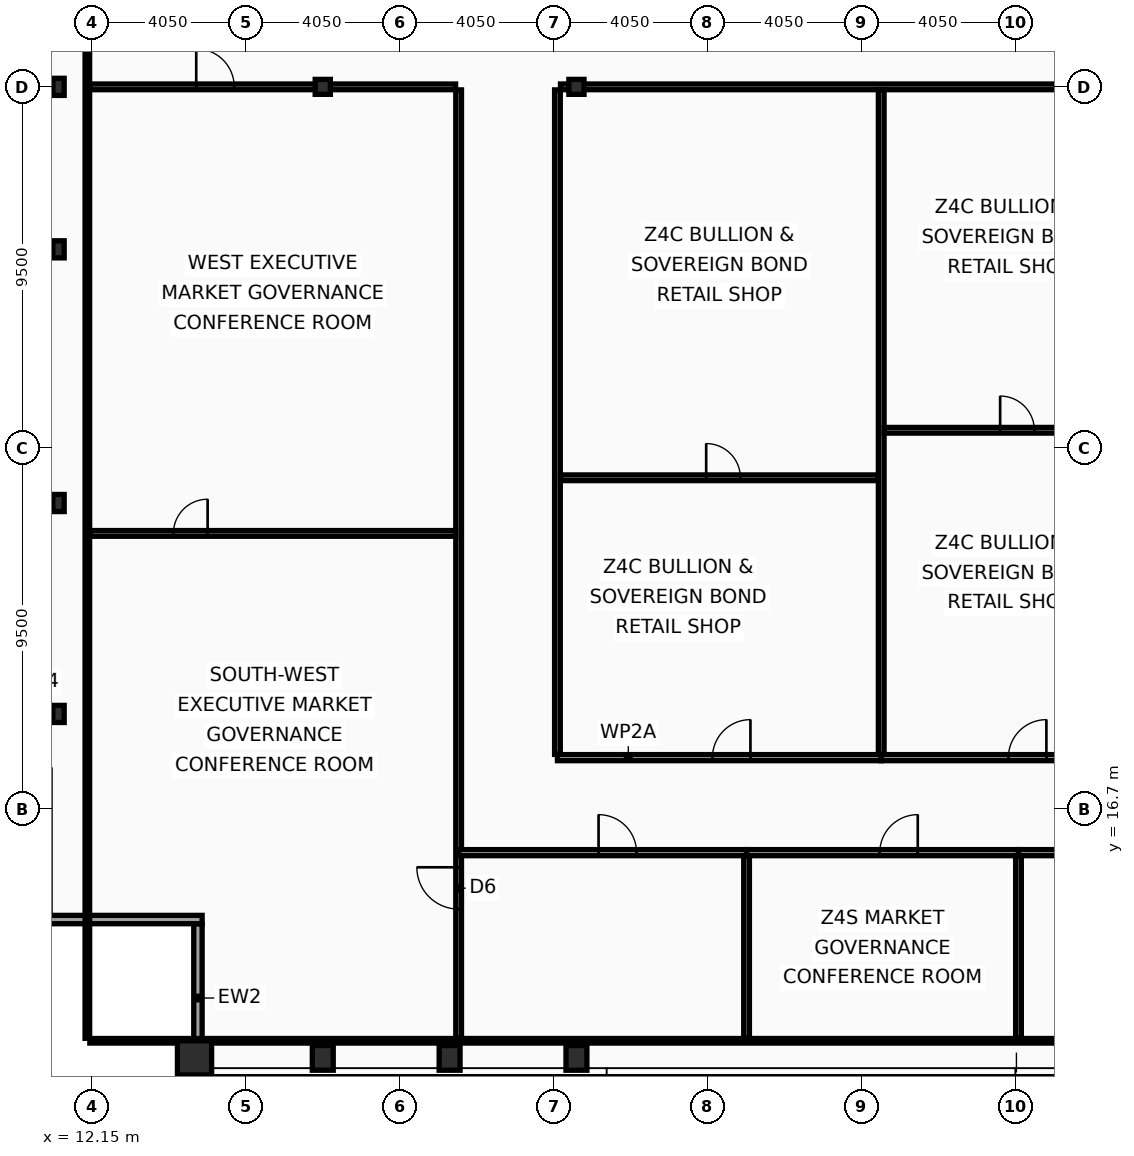
"""IFC4 building model, lengths in metres.
Left out: names, types, materials, properties, quantities, classifications, styles, units other than length and angle.
Written with IfcOpenShell. Run it as: python <this file> out.ifc"""

import sys

from ifc_helpers import new_model, si_unit, direction, frame, frame_2d, origin, origin_2d, place, context, subcontext, project, spatial, rectangle, hollow_rectangle, i_section, extrude, element, fill, save


model = new_model("IFC4")
c1 = context("Model", 3, precision=1e-05, world=origin(), true_north=direction((0.0, 1.0)))
c2 = subcontext(c1, "Body", "Model", "MODEL_VIEW")
j1 = project(units=[si_unit("LENGTHUNIT", "METRE"), si_unit("PLANEANGLEUNIT", "RADIAN")], contexts=[c1])
p1 = place(None, origin())
s1 = spatial("IfcSite", under=j1, at=p1, CompositionType="ELEMENT")
p2 = place(p1, origin())
s2 = spatial("IfcBuilding", under=s1, at=p2, CompositionType="ELEMENT")
p3 = place(p2, frame((0.0, 0.0, 343.4)))
s3 = spatial("IfcBuildingStorey", under=s2, at=p3, CompositionType="ELEMENT", Elevation=343.4)
p4 = place(p3, frame((14.85, 10.15, 0.0), z_axis=(0.0, 0.0, 1.0), x_axis=(1.0, 0.0, 0.0)))
e1 = element("IfcColumn", 1, at=p4, inside=s3, PredefinedType="COLUMN", context=c2, shape_type="SweptSolid", body=[
    extrude(hollow_rectangle(XDim=0.9, YDim=0.9, WallThickness=0.05, at=origin_2d()), origin(), (0.0, 0.0, 1.0), 3.6),
])
for number, where, z_axis, x_axis in (
    (2, (18.225, 10.15, 0.0), (0.0, 0.0, 1.0), (1.0, 0.0, 0.0)),
    (3, (21.562, 10.15, 0.0), (0.0, 0.0, 1.0), (1.0, 0.0, 0.0)),
    (4, (24.9, 10.15, 0.0), (0.0, 0.0, 1.0), (1.0, 0.0, 0.0)),
):
    element("IfcColumn", number, at=place(p3, frame(where, z_axis=z_axis, x_axis=x_axis)), inside=s3, PredefinedType="COLUMN", context=c2, shape_type="SweptSolid", body=[
        extrude(hollow_rectangle(XDim=0.55, YDim=0.65, WallThickness=0.04, at=origin_2d()), origin(), (0.0, 0.0, 1.0), 3.6),
    ])
for number, where, z_axis, x_axis in (
    (5, (11.27, 19.2, 0.0), (0.0, 0.0, 1.0), (1.0, 0.0, 0.0)),
    (6, (11.27, 24.75, 0.0), (0.0, 0.0, 1.0), (1.0, 0.0, 0.0)),
    (7, (11.27, 31.425, 0.0), (0.0, 0.0, 1.0), (1.0, 0.0, 0.0)),
    (8, (11.27, 35.7, 0.0), (0.0, 0.0, 1.0), (1.0, 0.0, 0.0)),
):
    element("IfcColumn", number, at=place(p3, frame(where, z_axis=z_axis, x_axis=x_axis)), inside=s3, PredefinedType="COLUMN", context=c2, shape_type="SweptSolid", body=[
        extrude(i_section(OverallWidth=0.3, OverallDepth=0.45, WebThickness=0.014, FlangeThickness=0.026, at=origin_2d()), origin(), (0.0, 0.0, 1.0), 3.6),
    ])
for number, where, z_axis, x_axis in (
    (9, (18.225, 35.7, 0.0), (0.0, 0.0, 1.0), (1.0, 0.0, 0.0)),
    (10, (24.9, 35.7, 0.0), (0.0, 0.0, 1.0), (1.0, 0.0, 0.0)),
):
    element("IfcColumn", number, at=place(p3, frame(where, z_axis=z_axis, x_axis=x_axis)), inside=s3, PredefinedType="COLUMN", context=c2, shape_type="SweptSolid", body=[
        extrude(i_section(OverallWidth=0.399, OverallDepth=0.393, WebThickness=0.023, FlangeThickness=0.037, at=origin_2d()), origin(), (0.0, 0.0, 1.0), 3.6),
    ])
p5 = place(p3, frame((14.94, 9.77, 0.0), z_axis=(0.0, 0.0, 1.0), x_axis=(0.0, 1.0, 0.0)))
e11 = element("IfcWall", 11, at=p5, inside=s3, PredefinedType="SOLIDWALL", context=c2, shape_type="SweptSolid", body=[
    extrude(rectangle(XDim=3.91, YDim=0.22, at=frame_2d((1.955, 0.0))), origin(), (0.0, 0.0, 1.0), 2.88),
])
p6 = place(p3, frame((15.05, 13.79, 0.0), z_axis=(0.0, 0.0, 1.0), x_axis=(-1.0, 0.0, 0.0)))
e12 = element("IfcWall", 12, at=p6, inside=s3, PredefinedType="SOLIDWALL", context=c2, shape_type="SweptSolid", body=[
    extrude(rectangle(XDim=4.22, YDim=0.22, at=frame_2d((2.11, 0.0))), origin(), (0.0, 0.0, 1.0), 2.88),
])
p7 = place(p3, frame((21.8, 10.665, 0.0), z_axis=(0.0, 0.0, 1.0), x_axis=(0.0, 1.0, 0.0)))
e13 = element("IfcWall", 13, at=p7, inside=s3, PredefinedType="PARTITIONING", context=c2, shape_type="SweptSolid", body=[
    extrude(rectangle(XDim=24.955, YDim=0.15, at=frame_2d((12.478, 0.0))), origin(), (0.0, 0.0, 1.0), 3.07),
])
p8 = place(p7, frame((3.4, 0.0, 0.0)))
e14 = element("IfcOpeningElement", 14, at=p8, cuts=e13, PredefinedType="OPENING", context=c2, shape_type="SweptSolid", body=[
    extrude(rectangle(XDim=1.1, YDim=2.1, at=frame_2d((0.55, 1.05))), frame((0.0, 0.085, 0.0), z_axis=(0.0, -1.0, 0.0), x_axis=(1.0, 0.0, 0.0)), (0.0, 0.0, 1.0), 0.17),
])
p9 = place(p3, frame((12.095, 35.7, 0.0), z_axis=(0.0, 0.0, 1.0), x_axis=(1.0, 0.0, 0.0)))
e15 = element("IfcWall", 15, at=p9, inside=s3, PredefinedType="PARTITIONING", context=c2, shape_type="SweptSolid", body=[
    extrude(rectangle(XDim=9.625, YDim=0.15, at=frame_2d((4.812, 0.0))), origin(), (0.0, 0.0, 1.0), 2.83),
])
p10 = place(p9, frame((2.8, 0.0, 0.0)))
e16 = element("IfcOpeningElement", 16, at=p10, cuts=e15, PredefinedType="OPENING", context=c2, shape_type="SweptSolid", body=[
    extrude(rectangle(XDim=1.0, YDim=2.05, at=frame_2d((0.5, 1.025))), frame((0.0, 0.085, 0.0), z_axis=(0.0, -1.0, 0.0), x_axis=(1.0, 0.0, 0.0)), (0.0, 0.0, 1.0), 0.17),
])
p11 = place(p3, frame((12.095, 23.95, 0.0), z_axis=(0.0, 0.0, 1.0), x_axis=(1.0, 0.0, 0.0)))
e17 = element("IfcWall", 17, at=p11, inside=s3, PredefinedType="PARTITIONING", context=c2, shape_type="SweptSolid", body=[
    extrude(rectangle(XDim=9.625, YDim=0.15, at=frame_2d((4.812, 0.0))), origin(), (0.0, 0.0, 1.0), 2.83),
])
p12 = place(p11, frame((2.2, 0.0, 0.0)))
e18 = element("IfcOpeningElement", 18, at=p12, cuts=e17, PredefinedType="OPENING", context=c2, shape_type="SweptSolid", body=[
    extrude(rectangle(XDim=0.9, YDim=2.05, at=frame_2d((0.45, 1.025))), frame((0.0, 0.085, 0.0), z_axis=(0.0, -1.0, 0.0), x_axis=(1.0, 0.0, 0.0)), (0.0, 0.0, 1.0), 0.17),
])
p13 = place(p3, frame((24.4, 18.135, 0.0), z_axis=(0.0, 0.0, 1.0), x_axis=(0.0, 1.0, 0.0)))
e19 = element("IfcWall", 19, at=p13, inside=s3, PredefinedType="PARTITIONING", context=c2, shape_type="SweptSolid", body=[
    extrude(rectangle(XDim=17.485, YDim=0.15, at=frame_2d((8.743, 0.0))), origin(), (0.0, 0.0, 1.0), 2.83),
])
p14 = place(p3, frame((24.48, 35.7, 0.0), z_axis=(0.0, 0.0, 1.0), x_axis=(1.0, 0.0, 0.0)))
e20 = element("IfcWall", 20, at=p14, inside=s3, PredefinedType="PARTITIONING", context=c2, shape_type="SweptSolid", body=[
    extrude(rectangle(XDim=25.02, YDim=0.15, at=frame_2d((12.51, 0.0))), origin(), (0.0, 0.0, 1.0), 2.83),
])
p15 = place(p3, frame((24.4, 18.05, 0.0), z_axis=(0.0, 0.0, 1.0), x_axis=(1.0, 0.0, 0.0)))
e21 = element("IfcWall", 21, at=p15, inside=s3, PredefinedType="PARTITIONING", context=c2, shape_type="SweptSolid", body=[
    extrude(rectangle(XDim=8.52, YDim=0.16, at=frame_2d((4.26, 0.0))), origin(), (0.0, 0.0, 1.0), 2.83),
])
p16 = place(p15, frame((4.078, 0.0, 0.0)))
e22 = element("IfcOpeningElement", 22, at=p16, cuts=e21, PredefinedType="OPENING", context=c2, shape_type="SweptSolid", body=[
    extrude(rectangle(XDim=1.0, YDim=2.05, at=frame_2d((0.5, 1.025))), frame((0.0, 0.09, 0.0), z_axis=(0.0, -1.0, 0.0), x_axis=(1.0, 0.0, 0.0)), (0.0, 0.0, 1.0), 0.18),
])
p17 = place(p3, frame((24.48, 25.414, 0.0), z_axis=(0.0, 0.0, 1.0), x_axis=(1.0, 0.0, 0.0)))
e23 = element("IfcWall", 23, at=p17, inside=s3, PredefinedType="PARTITIONING", context=c2, shape_type="SweptSolid", body=[
    extrude(rectangle(XDim=8.36, YDim=0.15, at=frame_2d((4.18, 0.0))), origin(), (0.0, 0.0, 1.0), 2.83),
])
p18 = place(p17, frame((3.834, 0.0, 0.0)))
e24 = element("IfcOpeningElement", 24, at=p18, cuts=e23, PredefinedType="OPENING", context=c2, shape_type="SweptSolid", body=[
    extrude(rectangle(XDim=0.9, YDim=2.05, at=frame_2d((0.45, 1.025))), frame((0.0, 0.085, 0.0), z_axis=(0.0, -1.0, 0.0), x_axis=(1.0, 0.0, 0.0)), (0.0, 0.0, 1.0), 0.17),
])
p19 = place(p3, frame((32.92, 18.05, 0.0), z_axis=(0.0, 0.0, 1.0), x_axis=(1.0, 0.0, 0.0)))
e25 = element("IfcWall", 25, at=p19, inside=s3, PredefinedType="PARTITIONING", context=c2, shape_type="SweptSolid", body=[
    extrude(rectangle(XDim=6.776, YDim=0.16, at=frame_2d((3.388, 0.0))), origin(), (0.0, 0.0, 1.0), 3.44),
])
p20 = place(p19, frame((3.346, 0.0, 0.0)))
e26 = element("IfcOpeningElement", 26, at=p20, cuts=e25, PredefinedType="OPENING", context=c2, shape_type="SweptSolid", body=[
    extrude(rectangle(XDim=1.0, YDim=2.05, at=frame_2d((0.5, 1.025))), frame((0.0, 0.09, 0.0), z_axis=(0.0, -1.0, 0.0), x_axis=(1.0, 0.0, 0.0)), (0.0, 0.0, 1.0), 0.18),
])
p21 = place(p3, frame((32.92, 18.135, 0.0), z_axis=(0.0, 0.0, 1.0), x_axis=(0.0, 1.0, 0.0)))
e27 = element("IfcWall", 27, at=p21, inside=s3, PredefinedType="PARTITIONING", context=c2, shape_type="SweptSolid", body=[
    extrude(rectangle(XDim=17.485, YDim=0.15, at=frame_2d((8.743, 0.0))), origin(), (0.0, 0.0, 1.0), 3.07),
])
p22 = place(p3, frame((33.0, 26.664, 0.0), z_axis=(0.0, 0.0, 1.0), x_axis=(1.0, 0.0, 0.0)))
e28 = element("IfcWall", 28, at=p22, inside=s3, PredefinedType="PARTITIONING", context=c2, shape_type="SweptSolid", body=[
    extrude(rectangle(XDim=6.616, YDim=0.15, at=frame_2d((3.308, 0.0))), origin(), (0.0, 0.0, 1.0), 3.44),
])
p23 = place(p22, frame((3.049, 0.0, 0.0)))
e29 = element("IfcOpeningElement", 29, at=p23, cuts=e28, PredefinedType="OPENING", context=c2, shape_type="SweptSolid", body=[
    extrude(rectangle(XDim=0.9, YDim=2.05, at=frame_2d((0.45, 1.025))), frame((0.0, 0.085, 0.0), z_axis=(0.0, -1.0, 0.0), x_axis=(1.0, 0.0, 0.0)), (0.0, 0.0, 1.0), 0.17),
])
p24 = place(p3, frame((21.8, 15.55, 0.0), z_axis=(0.0, 0.0, 1.0), x_axis=(1.0, 0.0, 0.0)))
e30 = element("IfcWall", 30, at=p24, inside=s3, PredefinedType="PARTITIONING", context=c2, shape_type="SweptSolid", body=[
    extrude(rectangle(XDim=7.576, YDim=0.16, at=frame_2d((3.788, 0.0))), origin(), (0.0, 0.0, 1.0), 2.83),
])
p25 = place(p24, frame((3.682, 0.0, 0.0)))
e31 = element("IfcOpeningElement", 31, at=p25, cuts=e30, PredefinedType="OPENING", context=c2, shape_type="SweptSolid", body=[
    extrude(rectangle(XDim=1.0, YDim=2.05, at=frame_2d((0.5, 1.025))), frame((0.0, 0.09, 0.0), z_axis=(0.0, -1.0, 0.0), x_axis=(1.0, 0.0, 0.0)), (0.0, 0.0, 1.0), 0.18),
])
p26 = place(p3, frame((29.376, 15.55, 0.0), z_axis=(0.0, 0.0, 1.0), x_axis=(1.0, 0.0, 0.0)))
e32 = element("IfcWall", 32, at=p26, inside=s3, PredefinedType="PARTITIONING", context=c2, shape_type="SweptSolid", body=[
    extrude(rectangle(XDim=7.155, YDim=0.16, at=frame_2d((3.578, 0.0))), origin(), (0.0, 0.0, 1.0), 3.07),
])
p27 = place(p26, frame((3.505, 0.0, 0.0)))
e33 = element("IfcOpeningElement", 33, at=p27, cuts=e32, PredefinedType="OPENING", context=c2, shape_type="SweptSolid", body=[
    extrude(rectangle(XDim=1.0, YDim=2.05, at=frame_2d((0.5, 1.025))), frame((0.0, 0.09, 0.0), z_axis=(0.0, -1.0, 0.0), x_axis=(1.0, 0.0, 0.0)), (0.0, 0.0, 1.0), 0.18),
])
p28 = place(p3, frame((29.376, 10.665, 0.0), z_axis=(0.0, 0.0, 1.0), x_axis=(0.0, 1.0, 0.0)))
e34 = element("IfcWall", 34, at=p28, inside=s3, PredefinedType="PARTITIONING", context=c2, shape_type="SweptSolid", body=[
    extrude(rectangle(XDim=4.8, YDim=0.15, at=frame_2d((2.4, 0.0))), origin(), (0.0, 0.0, 1.0), 3.07),
])
p29 = place(p3, frame((36.532, 15.55, 0.0), z_axis=(0.0, 0.0, 1.0), x_axis=(1.0, 0.0, 0.0)))
e35 = element("IfcWall", 35, at=p29, inside=s3, PredefinedType="PARTITIONING", context=c2, shape_type="SweptSolid", body=[
    extrude(rectangle(XDim=13.048, YDim=0.16, at=frame_2d((6.524, 0.0))), origin(), (0.0, 0.0, 1.0), 2.83),
])
p30 = place(p29, frame((5.98, 0.0, 0.0)))
e36 = element("IfcOpeningElement", 36, at=p30, cuts=e35, PredefinedType="OPENING", context=c2, shape_type="SweptSolid", body=[
    extrude(rectangle(XDim=1.0, YDim=2.05, at=frame_2d((0.5, 1.025))), frame((0.0, 0.09, 0.0), z_axis=(0.0, -1.0, 0.0), x_axis=(1.0, 0.0, 0.0)), (0.0, 0.0, 1.0), 0.18),
])
p31 = place(p3, frame((36.532, 10.665, 0.0), z_axis=(0.0, 0.0, 1.0), x_axis=(0.0, 1.0, 0.0)))
e37 = element("IfcWall", 37, at=p31, inside=s3, PredefinedType="PARTITIONING", context=c2, shape_type="SweptSolid", body=[
    extrude(rectangle(XDim=4.8, YDim=0.15, at=frame_2d((2.4, 0.0))), origin(), (0.0, 0.0, 1.0), 3.07),
])
p32 = place(p3, frame((12.03, 10.665, 0.0), z_axis=(0.0, 0.0, 1.0), x_axis=(0.0, 1.0, 0.0)))
e38 = element("IfcWall", 38, at=p32, inside=s3, PredefinedType="PARTITIONING", context=c2, shape_type="SweptSolid", body=[
    extrude(rectangle(XDim=42.11, YDim=0.12, at=frame_2d((21.055, 0.0))), origin(), (0.0, 0.0, 1.0), 2.83),
])
p33 = place(p3, frame((12.095, 10.6, 0.0), z_axis=(0.0, 0.0, 1.0), x_axis=(1.0, 0.0, 0.0)))
e39 = element("IfcWall", 39, at=p33, inside=s3, PredefinedType="PARTITIONING", context=c2, shape_type="SweptSolid", body=[
    extrude(rectangle(XDim=48.71, YDim=0.12, at=frame_2d((24.355, 0.0))), origin(), (0.0, 0.0, 1.0), 2.83),
])
p34 = place(p8, origin())
e40 = element("IfcDoor", 40, at=p34, inside=s3, OperationType="SINGLE_SWING_RIGHT", PredefinedType="DOOR", context=c2, shape_type="SweptSolid", body=[
    extrude(rectangle(XDim=1.1, YDim=2.1, at=frame_2d((0.55, 1.05))), frame((0.0, 0.025, 0.0), z_axis=(0.0, -1.0, 0.0), x_axis=(1.0, 0.0, 0.0)), (0.0, 0.0, 1.0), 0.05),
])
fill(e14, e40)
p35 = place(p10, origin())
e41 = element("IfcDoor", 41, at=p35, inside=s3, OperationType="SINGLE_SWING_LEFT", PredefinedType="DOOR", context=c2, shape_type="SweptSolid", body=[
    extrude(rectangle(XDim=1.0, YDim=2.05, at=frame_2d((0.5, 1.025))), frame((0.0, 0.025, 0.0), z_axis=(0.0, -1.0, 0.0), x_axis=(1.0, 0.0, 0.0)), (0.0, 0.0, 1.0), 0.05),
])
fill(e16, e41)
p36 = place(p12, origin())
e42 = element("IfcDoor", 42, at=p36, inside=s3, OperationType="SINGLE_SWING_RIGHT", PredefinedType="DOOR", context=c2, shape_type="SweptSolid", body=[
    extrude(rectangle(XDim=0.9, YDim=2.05, at=frame_2d((0.45, 1.025))), frame((0.0, 0.025, 0.0), z_axis=(0.0, -1.0, 0.0), x_axis=(1.0, 0.0, 0.0)), (0.0, 0.0, 1.0), 0.05),
])
fill(e18, e42)
p37 = place(p16, origin())
e43 = element("IfcDoor", 43, at=p37, inside=s3, OperationType="SINGLE_SWING_RIGHT", PredefinedType="DOOR", context=c2, shape_type="SweptSolid", body=[
    extrude(rectangle(XDim=1.0, YDim=2.05, at=frame_2d((0.5, 1.025))), frame((0.0, 0.025, 0.0), z_axis=(0.0, -1.0, 0.0), x_axis=(1.0, 0.0, 0.0)), (0.0, 0.0, 1.0), 0.05),
])
fill(e22, e43)
p38 = place(p18, origin())
e44 = element("IfcDoor", 44, at=p38, inside=s3, OperationType="SINGLE_SWING_LEFT", PredefinedType="DOOR", context=c2, shape_type="SweptSolid", body=[
    extrude(rectangle(XDim=0.9, YDim=2.05, at=frame_2d((0.45, 1.025))), frame((0.0, 0.025, 0.0), z_axis=(0.0, -1.0, 0.0), x_axis=(1.0, 0.0, 0.0)), (0.0, 0.0, 1.0), 0.05),
])
fill(e24, e44)
p39 = place(p20, origin())
e45 = element("IfcDoor", 45, at=p39, inside=s3, OperationType="SINGLE_SWING_RIGHT", PredefinedType="DOOR", context=c2, shape_type="SweptSolid", body=[
    extrude(rectangle(XDim=1.0, YDim=2.05, at=frame_2d((0.5, 1.025))), frame((0.0, 0.025, 0.0), z_axis=(0.0, -1.0, 0.0), x_axis=(1.0, 0.0, 0.0)), (0.0, 0.0, 1.0), 0.05),
])
fill(e26, e45)
p40 = place(p23, origin())
e46 = element("IfcDoor", 46, at=p40, inside=s3, OperationType="SINGLE_SWING_LEFT", PredefinedType="DOOR", context=c2, shape_type="SweptSolid", body=[
    extrude(rectangle(XDim=0.9, YDim=2.05, at=frame_2d((0.45, 1.025))), frame((0.0, 0.025, 0.0), z_axis=(0.0, -1.0, 0.0), x_axis=(1.0, 0.0, 0.0)), (0.0, 0.0, 1.0), 0.05),
])
fill(e29, e46)
p41 = place(p25, origin())
e47 = element("IfcDoor", 47, at=p41, inside=s3, OperationType="SINGLE_SWING_LEFT", PredefinedType="DOOR", context=c2, shape_type="SweptSolid", body=[
    extrude(rectangle(XDim=1.0, YDim=2.05, at=frame_2d((0.5, 1.025))), frame((0.0, 0.025, 0.0), z_axis=(0.0, -1.0, 0.0), x_axis=(1.0, 0.0, 0.0)), (0.0, 0.0, 1.0), 0.05),
])
fill(e31, e47)
p42 = place(p27, origin())
e48 = element("IfcDoor", 48, at=p42, inside=s3, OperationType="SINGLE_SWING_RIGHT", PredefinedType="DOOR", context=c2, shape_type="SweptSolid", body=[
    extrude(rectangle(XDim=1.0, YDim=2.05, at=frame_2d((0.5, 1.025))), frame((0.0, 0.025, 0.0), z_axis=(0.0, -1.0, 0.0), x_axis=(1.0, 0.0, 0.0)), (0.0, 0.0, 1.0), 0.05),
])
fill(e33, e48)
save(model, sys.argv[1])
